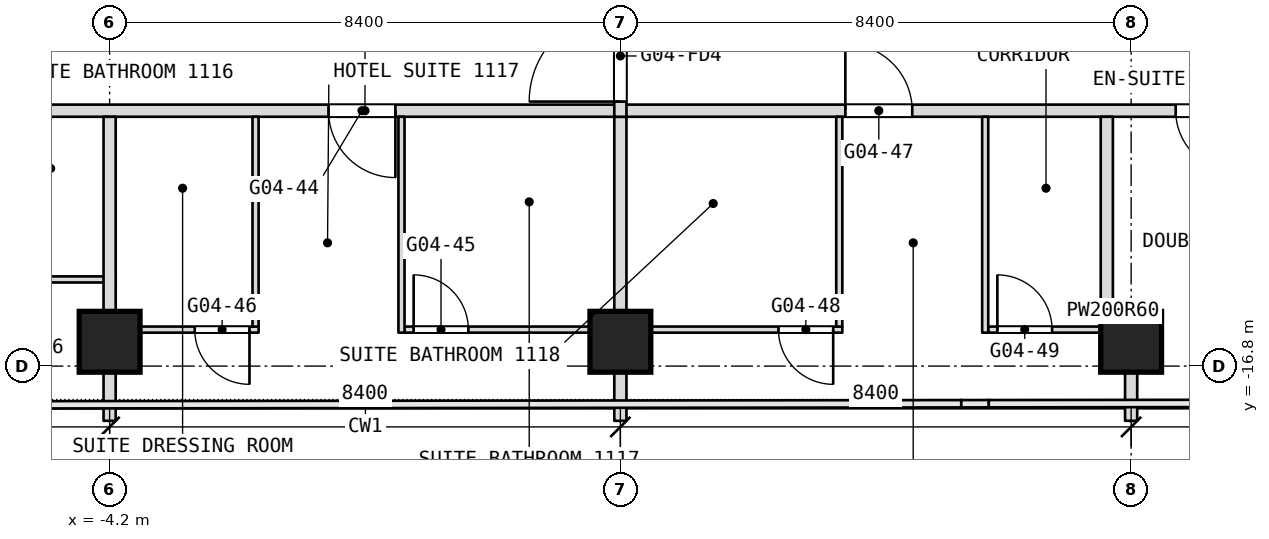
"""IFC4 building model, lengths in metres.
Left out: names, types, materials, properties, quantities, classifications, styles, units other than length and angle.
Written with IfcOpenShell. Run it as: python <this file> out.ifc"""

import sys

from ifc_helpers import new_model, si_unit, direction, frame, frame_2d, origin, origin_2d, place, context, subcontext, project, spatial, rectangle, extrude, element, fill, save


model = new_model("IFC4")
c1 = context("Model", 3, precision=1e-05, world=origin(), true_north=direction((0.0, 1.0)))
c2 = subcontext(c1, "Body", "Model", "MODEL_VIEW")
j1 = project(units=[si_unit("LENGTHUNIT", "METRE"), si_unit("PLANEANGLEUNIT", "RADIAN")], contexts=[c1])
p1 = place(None, origin())
s1 = spatial("IfcSite", under=j1, at=p1, CompositionType="ELEMENT")
p2 = place(p1, origin())
s2 = spatial("IfcBuilding", under=s1, at=p2, CompositionType="ELEMENT")
p3 = place(p2, frame((0.0, 0.0, 54.5)))
s3 = spatial("IfcBuildingStorey", under=s2, at=p3, CompositionType="ELEMENT", Elevation=54.5)
for number, where, z_axis, x_axis in (
    (1, (12.6, -16.4, 0.0), (0.0, 0.0, 1.0), (1.0, 0.0, 0.0)),
    (2, (4.2, -16.4, 0.0), (0.0, 0.0, 1.0), (1.0, 0.0, 0.0)),
    (3, (-4.2, -16.4, 0.0), (0.0, 0.0, 1.0), (1.0, 0.0, 0.0)),
):
    element("IfcColumn", number, at=place(p3, frame(where, z_axis=z_axis, x_axis=x_axis)), inside=s3, PredefinedType="COLUMN", context=c2, shape_type="SweptSolid", body=[
        extrude(rectangle(XDim=1.0, YDim=1.0, at=origin_2d()), origin(), (0.0, 0.0, 1.0), 3.6),
    ])
p4 = place(p3, frame((-4.1, -16.2, 0.0), z_axis=(0.0, 0.0, 1.0), x_axis=(1.0, 0.0, 0.0)))
e4 = element("IfcWall", 4, at=p4, inside=s3, PredefinedType="PARTITIONING", context=c2, shape_type="SweptSolid", body=[
    extrude(rectangle(XDim=2.35, YDim=0.1, at=frame_2d((1.175, 0.0))), origin(), (0.0, 0.0, 1.0), 2.94),
])
p5 = place(p4, frame((1.3, 0.0, 0.0)))
e5 = element("IfcOpeningElement", 5, at=p5, cuts=e4, PredefinedType="OPENING", context=c2, shape_type="SweptSolid", body=[
    extrude(rectangle(XDim=0.9, YDim=2.1, at=frame_2d((0.45, 1.05))), frame((0.0, 0.05, 0.0), z_axis=(0.0, -1.0, 0.0), x_axis=(1.0, 0.0, 0.0)), (0.0, 0.0, 1.0), 0.1),
])
p6 = place(p3, frame((0.65, -16.2, 0.0), z_axis=(0.0, 0.0, 1.0), x_axis=(1.0, 0.0, 0.0)))
e6 = element("IfcWall", 6, at=p6, inside=s3, PredefinedType="PARTITIONING", context=c2, shape_type="SweptSolid", body=[
    extrude(rectangle(XDim=7.2, YDim=0.1, at=frame_2d((3.6, 0.0))), origin(), (0.0, 0.0, 1.0), 2.94),
])
p7 = place(p6, frame((0.15, 0.0, 0.0)))
e7 = element("IfcOpeningElement", 7, at=p7, cuts=e6, PredefinedType="OPENING", context=c2, shape_type="SweptSolid", body=[
    extrude(rectangle(XDim=0.9, YDim=2.1, at=frame_2d((0.45, 1.05))), frame((0.0, 0.05, 0.0), z_axis=(0.0, -1.0, 0.0), x_axis=(1.0, 0.0, 0.0)), (0.0, 0.0, 1.0), 0.1),
])
p8 = place(p6, frame((6.15, 0.0, 0.0)))
e8 = element("IfcOpeningElement", 8, at=p8, cuts=e6, PredefinedType="OPENING", context=c2, shape_type="SweptSolid", body=[
    extrude(rectangle(XDim=0.9, YDim=2.1, at=frame_2d((0.45, 1.05))), frame((0.0, 0.05, 0.0), z_axis=(0.0, -1.0, 0.0), x_axis=(1.0, 0.0, 0.0)), (0.0, 0.0, 1.0), 0.1),
])
p9 = place(p3, frame((10.25, -16.2, 0.0), z_axis=(0.0, 0.0, 1.0), x_axis=(1.0, 0.0, 0.0)))
e9 = element("IfcWall", 9, at=p9, inside=s3, PredefinedType="PARTITIONING", context=c2, shape_type="SweptSolid", body=[
    extrude(rectangle(XDim=2.45, YDim=0.1, at=frame_2d((1.225, 0.0))), origin(), (0.0, 0.0, 1.0), 3.34),
])
p10 = place(p9, frame((0.15, 0.0, 0.0)))
e10 = element("IfcOpeningElement", 10, at=p10, cuts=e9, PredefinedType="OPENING", context=c2, shape_type="SweptSolid", body=[
    extrude(rectangle(XDim=0.9, YDim=2.1, at=frame_2d((0.45, 1.05))), frame((0.0, 0.05, 0.0), z_axis=(0.0, -1.0, 0.0), x_axis=(1.0, 0.0, 0.0)), (0.0, 0.0, 1.0), 0.1),
])
p11 = place(p3, frame((12.1, -15.9, 0.0), z_axis=(0.0, 0.0, 1.0), x_axis=(1.0, 0.0, 0.0)))
e11 = element("IfcWall", 11, at=p11, inside=s3, PredefinedType="PARTITIONING", context=c2, shape_type="SweptSolid", body=[
    extrude(rectangle(XDim=0.4, YDim=0.2, at=frame_2d((0.2, 0.0))), origin(), (0.0, 0.0, 1.0), 3.34),
])
p12 = place(p3, frame((-6.55, -15.375, 0.0), z_axis=(0.0, 0.0, 1.0), x_axis=(1.0, 0.0, 0.0)))
e12 = element("IfcWall", 12, at=p12, inside=s3, PredefinedType="PARTITIONING", context=c2, shape_type="SweptSolid", body=[
    extrude(rectangle(XDim=2.45, YDim=0.1, at=frame_2d((1.225, 0.0))), origin(), (0.0, 0.0, 1.0), 3.34),
])
p13 = place(p12, frame((0.15, 0.0, 0.0)))
e13 = element("IfcOpeningElement", 13, at=p13, cuts=e12, PredefinedType="OPENING", context=c2, shape_type="SweptSolid", body=[
    extrude(rectangle(XDim=0.9, YDim=2.1, at=frame_2d((0.45, 1.05))), frame((0.0, 0.05, 0.0), z_axis=(0.0, -1.0, 0.0), x_axis=(1.0, 0.0, 0.0)), (0.0, 0.0, 1.0), 0.1),
])
p14 = place(p3, frame((12.6, -17.7, 0.0), z_axis=(0.0, 0.0, 1.0), x_axis=(0.0, 1.0, 0.0)))
e14 = element("IfcWall", 14, at=p14, inside=s3, PredefinedType="PARTITIONING", context=c2, shape_type="SweptSolid", body=[
    extrude(rectangle(XDim=1.9, YDim=0.2, at=frame_2d((0.95, 0.0))), origin(), (0.0, 0.0, 1.0), 3.34),
])
p15 = place(p3, frame((-16.7, -12.6, 0.0), z_axis=(0.0, 0.0, 1.0), x_axis=(1.0, 0.0, 0.0)))
e15 = element("IfcWall", 15, at=p15, inside=s3, PredefinedType="PARTITIONING", context=c2, shape_type="SweptSolid", body=[
    extrude(rectangle(XDim=33.4, YDim=0.2, at=frame_2d((16.7, 0.0))), origin(), (0.0, 0.0, 1.0), 3.34),
])
p16 = place(p15, frame((6.9, 0.0, 0.0)))
e16 = element("IfcOpeningElement", 16, at=p16, cuts=e15, PredefinedType="OPENING", context=c2, shape_type="SweptSolid", body=[
    extrude(rectangle(XDim=1.0, YDim=2.1, at=frame_2d((0.5, 1.05))), frame((0.0, 0.1, 0.0), z_axis=(0.0, -1.0, 0.0), x_axis=(1.0, 0.0, 0.0)), (0.0, 0.0, 1.0), 0.2),
])
p17 = place(p15, frame((8.7, 0.0, 0.0)))
e17 = element("IfcOpeningElement", 17, at=p17, cuts=e15, PredefinedType="OPENING", context=c2, shape_type="SweptSolid", body=[
    extrude(rectangle(XDim=1.0, YDim=2.1, at=frame_2d((0.5, 1.05))), frame((0.0, 0.1, 0.0), z_axis=(0.0, -1.0, 0.0), x_axis=(1.0, 0.0, 0.0)), (0.0, 0.0, 1.0), 0.2),
])
p18 = place(p15, frame((16.1, 0.0, 0.0)))
e18 = element("IfcOpeningElement", 18, at=p18, cuts=e15, PredefinedType="OPENING", context=c2, shape_type="SweptSolid", body=[
    extrude(rectangle(XDim=1.1, YDim=2.1, at=frame_2d((0.55, 1.05))), frame((0.0, 0.1, 0.0), z_axis=(0.0, -1.0, 0.0), x_axis=(1.0, 0.0, 0.0)), (0.0, 0.0, 1.0), 0.2),
])
p19 = place(p15, frame((24.6, 0.0, 0.0)))
e19 = element("IfcOpeningElement", 19, at=p19, cuts=e15, PredefinedType="OPENING", context=c2, shape_type="SweptSolid", body=[
    extrude(rectangle(XDim=1.1, YDim=2.1, at=frame_2d((0.55, 1.05))), frame((0.0, 0.1, 0.0), z_axis=(0.0, -1.0, 0.0), x_axis=(1.0, 0.0, 0.0)), (0.0, 0.0, 1.0), 0.2),
])
p20 = place(p15, frame((2.317, 0.0, 0.0)))
e20 = element("IfcOpeningElement", 20, at=p20, cuts=e15, PredefinedType="OPENING", context=c2, shape_type="SweptSolid", body=[
    extrude(rectangle(XDim=1.0, YDim=2.1, at=frame_2d((0.5, 1.05))), frame((0.0, 0.1, 0.0), z_axis=(0.0, -1.0, 0.0), x_axis=(1.0, 0.0, 0.0)), (0.0, 0.0, 1.0), 0.2),
])
p21 = place(p15, frame((30.033, 0.0, 0.0)))
e21 = element("IfcOpeningElement", 21, at=p21, cuts=e15, PredefinedType="OPENING", context=c2, shape_type="SweptSolid", body=[
    extrude(rectangle(XDim=1.0, YDim=2.1, at=frame_2d((0.5, 1.05))), frame((0.0, 0.1, 0.0), z_axis=(0.0, -1.0, 0.0), x_axis=(1.0, 0.0, 0.0)), (0.0, 0.0, 1.0), 0.2),
])
p22 = place(p3, frame((12.2, -15.8, 0.0), z_axis=(0.0, 0.0, 1.0), x_axis=(0.0, 1.0, 0.0)))
e22 = element("IfcWall", 22, at=p22, inside=s3, PredefinedType="PARTITIONING", context=c2, shape_type="SweptSolid", body=[
    extrude(rectangle(XDim=3.1, YDim=0.2, at=frame_2d((1.55, 0.0))), origin(), (0.0, 0.0, 1.0), 3.34),
])
p23 = place(p3, frame((10.2, -16.25, 0.0), z_axis=(0.0, 0.0, 1.0), x_axis=(0.0, 1.0, 0.0)))
e23 = element("IfcWall", 23, at=p23, inside=s3, PredefinedType="PARTITIONING", context=c2, shape_type="SweptSolid", body=[
    extrude(rectangle(XDim=3.55, YDim=0.1, at=frame_2d((1.775, 0.0))), origin(), (0.0, 0.0, 1.0), 3.34),
])
p24 = place(p3, frame((7.8, -16.15, 0.0), z_axis=(0.0, 0.0, 1.0), x_axis=(0.0, 1.0, 0.0)))
e24 = element("IfcWall", 24, at=p24, inside=s3, PredefinedType="PARTITIONING", context=c2, shape_type="SweptSolid", body=[
    extrude(rectangle(XDim=3.45, YDim=0.1, at=frame_2d((1.725, 0.0))), origin(), (0.0, 0.0, 1.0), 3.34),
])
p25 = place(p3, frame((4.2, -17.7, 0.0), z_axis=(0.0, 0.0, 1.0), x_axis=(0.0, 1.0, 0.0)))
e25 = element("IfcWall", 25, at=p25, inside=s3, PredefinedType="PARTITIONING", context=c2, shape_type="SweptSolid", body=[
    extrude(rectangle(XDim=5.0, YDim=0.2, at=frame_2d((2.5, 0.0))), origin(), (0.0, 0.0, 1.0), 3.34),
])
p26 = place(p3, frame((4.2, -12.7, 0.0), z_axis=(0.0, 0.0, 1.0), x_axis=(0.0, 1.0, 0.0)))
e26 = element("IfcWall", 26, at=p26, inside=s3, PredefinedType="PARTITIONING", context=c2, shape_type="SweptSolid", body=[
    extrude(rectangle(XDim=12.7, YDim=0.2, at=frame_2d((6.35, 0.0))), origin(), (0.0, 0.0, 1.0), 3.34),
])
p27 = place(p26, frame((11.05, 0.0, 0.0)))
e27 = element("IfcOpeningElement", 27, at=p27, cuts=e26, PredefinedType="OPENING", context=c2, shape_type="SweptSolid", body=[
    extrude(rectangle(XDim=1.5, YDim=2.1, at=frame_2d((0.75, 1.05))), frame((0.0, 0.1, 0.0), z_axis=(0.0, -1.0, 0.0), x_axis=(1.0, 0.0, 0.0)), (0.0, 0.0, 1.0), 0.2),
])
p28 = place(p26, frame((0.25, 0.0, 0.0)))
e28 = element("IfcOpeningElement", 28, at=p28, cuts=e26, PredefinedType="OPENING", context=c2, shape_type="SweptSolid", body=[
    extrude(rectangle(XDim=1.5, YDim=2.1, at=frame_2d((0.75, 1.05))), frame((0.0, 0.1, 0.0), z_axis=(0.0, -1.0, 0.0), x_axis=(1.0, 0.0, 0.0)), (0.0, 0.0, 1.0), 0.2),
])
p29 = place(p3, frame((0.6, -16.25, 0.0), z_axis=(0.0, 0.0, 1.0), x_axis=(0.0, 1.0, 0.0)))
e29 = element("IfcWall", 29, at=p29, inside=s3, PredefinedType="PARTITIONING", context=c2, shape_type="SweptSolid", body=[
    extrude(rectangle(XDim=3.55, YDim=0.1, at=frame_2d((1.775, 0.0))), origin(), (0.0, 0.0, 1.0), 3.34),
])
p30 = place(p3, frame((-1.8, -16.15, 0.0), z_axis=(0.0, 0.0, 1.0), x_axis=(0.0, 1.0, 0.0)))
e30 = element("IfcWall", 30, at=p30, inside=s3, PredefinedType="PARTITIONING", context=c2, shape_type="SweptSolid", body=[
    extrude(rectangle(XDim=3.45, YDim=0.1, at=frame_2d((1.725, 0.0))), origin(), (0.0, 0.0, 1.0), 3.34),
])
p31 = place(p3, frame((-4.2, -17.7, 0.0), z_axis=(0.0, 0.0, 1.0), x_axis=(0.0, 1.0, 0.0)))
e31 = element("IfcWall", 31, at=p31, inside=s3, PredefinedType="PARTITIONING", context=c2, shape_type="SweptSolid", body=[
    extrude(rectangle(XDim=5.0, YDim=0.2, at=frame_2d((2.5, 0.0))), origin(), (0.0, 0.0, 1.0), 3.34),
])
p32 = place(p5, origin())
e32 = element("IfcDoor", 32, at=p32, inside=s3, OperationType="SINGLE_SWING_RIGHT", PredefinedType="DOOR", context=c2, shape_type="SweptSolid", body=[
    extrude(rectangle(XDim=0.9, YDim=2.1, at=frame_2d((0.45, 1.05))), frame((0.0, 0.025, 0.0), z_axis=(0.0, -1.0, 0.0), x_axis=(1.0, 0.0, 0.0)), (0.0, 0.0, 1.0), 0.05),
])
fill(e5, e32)
p33 = place(p7, origin())
e33 = element("IfcDoor", 33, at=p33, inside=s3, OperationType="SINGLE_SWING_LEFT", PredefinedType="DOOR", context=c2, shape_type="SweptSolid", body=[
    extrude(rectangle(XDim=0.9, YDim=2.1, at=frame_2d((0.45, 1.05))), frame((0.0, 0.025, 0.0), z_axis=(0.0, -1.0, 0.0), x_axis=(1.0, 0.0, 0.0)), (0.0, 0.0, 1.0), 0.05),
])
fill(e7, e33)
p34 = place(p8, origin())
e34 = element("IfcDoor", 34, at=p34, inside=s3, OperationType="SINGLE_SWING_RIGHT", PredefinedType="DOOR", context=c2, shape_type="SweptSolid", body=[
    extrude(rectangle(XDim=0.9, YDim=2.1, at=frame_2d((0.45, 1.05))), frame((0.0, 0.025, 0.0), z_axis=(0.0, -1.0, 0.0), x_axis=(1.0, 0.0, 0.0)), (0.0, 0.0, 1.0), 0.05),
])
fill(e8, e34)
p35 = place(p10, origin())
e35 = element("IfcDoor", 35, at=p35, inside=s3, OperationType="SINGLE_SWING_LEFT", PredefinedType="DOOR", context=c2, shape_type="SweptSolid", body=[
    extrude(rectangle(XDim=0.9, YDim=2.1, at=frame_2d((0.45, 1.05))), frame((0.0, 0.025, 0.0), z_axis=(0.0, -1.0, 0.0), x_axis=(1.0, 0.0, 0.0)), (0.0, 0.0, 1.0), 0.05),
])
fill(e10, e35)
p36 = place(p18, origin())
e36 = element("IfcDoor", 36, at=p36, inside=s3, OperationType="SINGLE_SWING_LEFT", PredefinedType="DOOR", context=c2, shape_type="SweptSolid", body=[
    extrude(rectangle(XDim=1.1, YDim=2.1, at=frame_2d((0.55, 1.05))), frame((0.0, 0.025, 0.0), z_axis=(0.0, -1.0, 0.0), x_axis=(1.0, 0.0, 0.0)), (0.0, 0.0, 1.0), 0.05),
])
fill(e18, e36)
p37 = place(p19, origin())
e37 = element("IfcDoor", 37, at=p37, inside=s3, OperationType="SINGLE_SWING_RIGHT", PredefinedType="DOOR", context=c2, shape_type="SweptSolid", body=[
    extrude(rectangle(XDim=1.1, YDim=2.1, at=frame_2d((0.55, 1.05))), frame((0.0, 0.025, 0.0), z_axis=(0.0, -1.0, 0.0), x_axis=(1.0, 0.0, 0.0)), (0.0, 0.0, 1.0), 0.05),
])
fill(e19, e37)
p38 = place(p21, origin())
e38 = element("IfcDoor", 38, at=p38, inside=s3, OperationType="SINGLE_SWING_LEFT", PredefinedType="DOOR", context=c2, shape_type="SweptSolid", body=[
    extrude(rectangle(XDim=1.0, YDim=2.1, at=frame_2d((0.5, 1.05))), frame((0.0, 0.025, 0.0), z_axis=(0.0, -1.0, 0.0), x_axis=(1.0, 0.0, 0.0)), (0.0, 0.0, 1.0), 0.05),
])
fill(e21, e38)
p39 = place(p28, origin())
e39 = element("IfcDoor", 39, at=p39, inside=s3, OperationType="DOUBLE_DOOR_DOUBLE_SWING", PredefinedType="DOOR", context=c2, shape_type="SweptSolid", body=[
    extrude(rectangle(XDim=1.5, YDim=2.1, at=frame_2d((0.75, 1.05))), frame((0.0, 0.025, 0.0), z_axis=(0.0, -1.0, 0.0), x_axis=(1.0, 0.0, 0.0)), (0.0, 0.0, 1.0), 0.05),
])
fill(e28, e39)
save(model, sys.argv[1])
